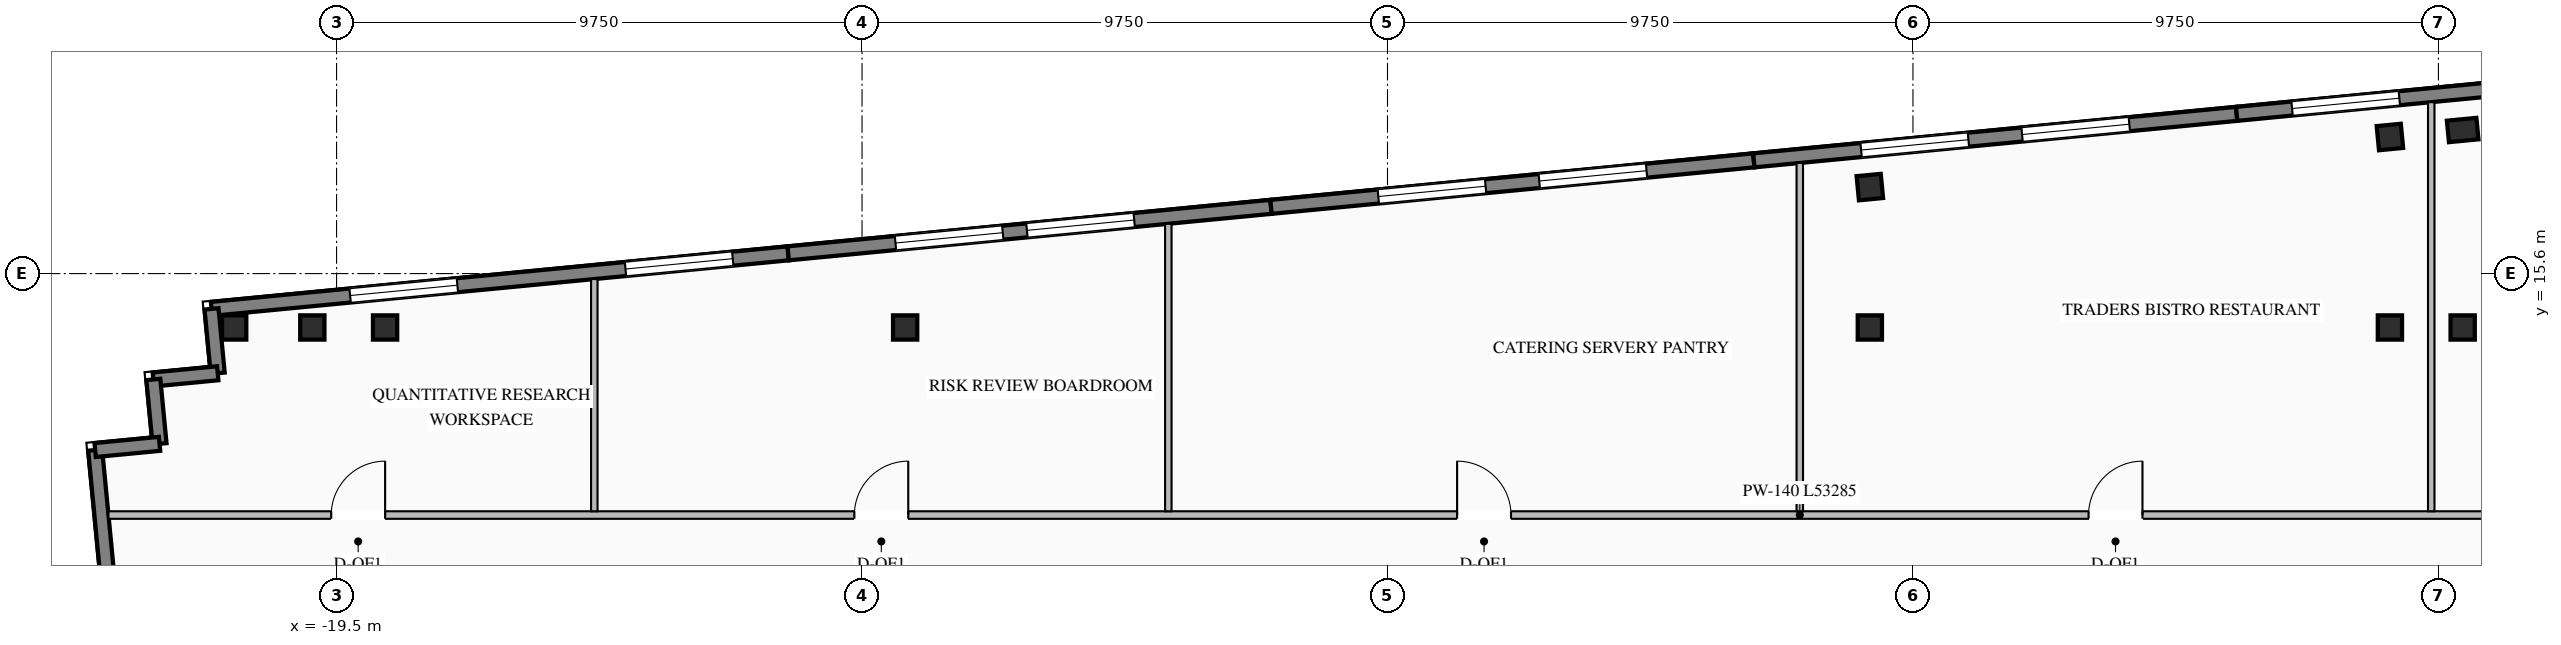
"""IFC4 building model, lengths in metres.
Left out: names, types, materials, properties, quantities, classifications, styles, units other than length and angle.
Written with IfcOpenShell. Run it as: python <this file> out.ifc"""

import sys

from ifc_helpers import new_model, si_unit, direction, frame, frame_2d, origin, origin_2d, place, context, subcontext, project, spatial, rectangle, i_section, extrude, element, fill, save


model = new_model("IFC4")
c1 = context("Model", 3, precision=1e-05, world=origin(), true_north=direction((0.0, 1.0)))
c2 = subcontext(c1, "Body", "Model", "MODEL_VIEW")
j1 = project(units=[si_unit("LENGTHUNIT", "METRE"), si_unit("PLANEANGLEUNIT", "RADIAN")], contexts=[c1])
p1 = place(None, origin())
s1 = spatial("IfcSite", under=j1, at=p1, CompositionType="ELEMENT")
p2 = place(p1, origin())
s2 = spatial("IfcBuilding", under=s1, at=p2, CompositionType="ELEMENT")
p3 = place(p2, frame((0.0, 0.0, 262.05)))
s3 = spatial("IfcBuildingStorey", under=s2, at=p3, CompositionType="ELEMENT", Elevation=262.05)
for number, where, z_axis, x_axis in (
    (1, (-21.4, 14.6, 0.0), (0.0, 0.0, 1.0), (1.0, 0.0, 0.0)),
    (2, (-19.95, 14.6, 0.0), (0.0, 0.0, 1.0), (1.0, 0.0, 0.0)),
    (3, (-18.6, 14.6, 0.0), (0.0, 0.0, 1.0), (1.0, 0.0, 0.0)),
    (4, (-8.95, 14.6, 0.0), (0.0, 0.0, 1.0), (1.0, 0.0, 0.0)),
    (5, (8.95, 14.6, 0.0), (0.0, 0.0, 1.0), (1.0, 0.0, 0.0)),
    (6, (18.6, 14.6, 0.0), (0.0, 0.0, 1.0), (1.0, 0.0, 0.0)),
    (7, (19.95, 14.6, 0.0), (0.0, 0.0, 1.0), (1.0, 0.0, 0.0)),
    (8, (8.95, 17.205, 0.0), (0.0, 0.0, 1.0), (0.995, 0.096, 0.0)),
    (9, (18.6, 18.134, 0.0), (0.0, 0.0, 1.0), (0.995, 0.096, 0.0)),
):
    element("IfcColumn", number, at=place(p3, frame(where, z_axis=z_axis, x_axis=x_axis)), inside=s3, PredefinedType="COLUMN", context=c2, shape_type="SweptSolid", body=[
        extrude(i_section(OverallWidth=0.45, OverallDepth=0.45, WebThickness=0.022, FlangeThickness=0.032, at=origin_2d()), origin(), (0.0, 0.0, 1.0), 3.45),
    ])
p4 = place(p3, frame((19.95, 18.264, 0.0), z_axis=(0.0, 0.0, 1.0), x_axis=(0.995396198367, 0.09584575252, 0.0)))
e10 = element("IfcColumn", 10, at=p4, inside=s3, PredefinedType="PILASTER", context=c2, shape_type="SweptSolid", body=[
    extrude(rectangle(XDim=0.55, YDim=0.4, at=origin_2d()), origin(), (0.0, 0.0, 1.0), 3.45),
])
p5 = place(p3, frame((-21.821, 14.945, 0.0), z_axis=(0.0, 0.0, 1.0), x_axis=(0.995394787719, 0.095860401528, 0.0)))
e11 = element("IfcWall", 11, at=p5, inside=s3, PredefinedType="STANDARD", context=c2, shape_type="SweptSolid", body=[
    extrude(rectangle(XDim=10.75, YDim=0.26, at=frame_2d((5.375, 0.0))), origin(), (0.0, 0.0, 1.0), 3.25),
])
p6 = place(p5, frame((2.583, 0.0, 0.76)))
e12 = element("IfcOpeningElement", 12, at=p6, cuts=e11, PredefinedType="OPENING", context=c2, shape_type="SweptSolid", body=[
    extrude(rectangle(XDim=2.0, YDim=2.05, at=frame_2d((1.0, 1.025))), frame((0.0, 0.14, 0.0), z_axis=(0.0, -1.0, 0.0), x_axis=(1.0, 0.0, 0.0)), (0.0, 0.0, 1.0), 0.28),
])
p7 = place(p5, frame((7.717, 0.0, 0.76)))
e13 = element("IfcOpeningElement", 13, at=p7, cuts=e11, PredefinedType="OPENING", context=c2, shape_type="SweptSolid", body=[
    extrude(rectangle(XDim=2.0, YDim=2.05, at=frame_2d((1.0, 1.025))), frame((0.0, 0.14, 0.0), z_axis=(0.0, -1.0, 0.0), x_axis=(1.0, 0.0, 0.0)), (0.0, 0.0, 1.0), 0.28),
])
p8 = place(p3, frame((-11.12, 15.975, 0.0), z_axis=(0.0, 0.0, 1.0), x_axis=(0.995396794462, 0.09583956164, 0.0)))
e14 = element("IfcWall", 14, at=p8, inside=s3, PredefinedType="STANDARD", context=c2, shape_type="SweptSolid", body=[
    extrude(rectangle(XDim=9.0, YDim=0.26, at=frame_2d((4.5, 0.0))), origin(), (0.0, 0.0, 1.0), 3.25),
])
p9 = place(p8, frame((2.0, 0.0, 0.76)))
e15 = element("IfcOpeningElement", 15, at=p9, cuts=e14, PredefinedType="OPENING", context=c2, shape_type="SweptSolid", body=[
    extrude(rectangle(XDim=2.0, YDim=2.05, at=frame_2d((1.0, 1.025))), frame((0.0, 0.14, 0.0), z_axis=(0.0, -1.0, 0.0), x_axis=(1.0, 0.0, 0.0)), (0.0, 0.0, 1.0), 0.28),
])
p10 = place(p8, frame((4.45, 0.0, 0.76)))
e16 = element("IfcOpeningElement", 16, at=p10, cuts=e14, PredefinedType="OPENING", context=c2, shape_type="SweptSolid", body=[
    extrude(rectangle(XDim=2.0, YDim=2.05, at=frame_2d((1.0, 1.025))), frame((0.0, 0.14, 0.0), z_axis=(0.0, -1.0, 0.0), x_axis=(1.0, 0.0, 0.0)), (0.0, 0.0, 1.0), 0.28),
])
p11 = place(p3, frame((-2.161, 16.838, 0.0), z_axis=(0.0, 0.0, 1.0), x_axis=(0.995396794462, 0.09583956164, 0.0)))
e17 = element("IfcWall", 17, at=p11, inside=s3, PredefinedType="STANDARD", context=c2, shape_type="SweptSolid", body=[
    extrude(rectangle(XDim=9.0, YDim=0.26, at=frame_2d((4.5, 0.0))), origin(), (0.0, 0.0, 1.0), 3.25),
])
p12 = place(p11, frame((2.0, 0.0, 0.76)))
e18 = element("IfcOpeningElement", 18, at=p12, cuts=e17, PredefinedType="OPENING", context=c2, shape_type="SweptSolid", body=[
    extrude(rectangle(XDim=2.0, YDim=2.05, at=frame_2d((1.0, 1.025))), frame((0.0, 0.14, 0.0), z_axis=(0.0, -1.0, 0.0), x_axis=(1.0, 0.0, 0.0)), (0.0, 0.0, 1.0), 0.28),
])
p13 = place(p11, frame((5.0, 0.0, 0.76)))
e19 = element("IfcOpeningElement", 19, at=p13, cuts=e17, PredefinedType="OPENING", context=c2, shape_type="SweptSolid", body=[
    extrude(rectangle(XDim=2.0, YDim=2.05, at=frame_2d((1.0, 1.025))), frame((0.0, 0.14, 0.0), z_axis=(0.0, -1.0, 0.0), x_axis=(1.0, 0.0, 0.0)), (0.0, 0.0, 1.0), 0.28),
])
p14 = place(p3, frame((6.797, 17.7, 0.0), z_axis=(0.0, 0.0, 1.0), x_axis=(0.995394455533, 0.09586385082, 0.0)))
e20 = element("IfcWall", 20, at=p14, inside=s3, PredefinedType="STANDARD", context=c2, shape_type="SweptSolid", body=[
    extrude(rectangle(XDim=9.0, YDim=0.26, at=frame_2d((4.5, 0.0))), origin(), (0.0, 0.0, 1.0), 3.25),
])
p15 = place(p14, frame((2.0, 0.0, 0.76)))
e21 = element("IfcOpeningElement", 21, at=p15, cuts=e20, PredefinedType="OPENING", context=c2, shape_type="SweptSolid", body=[
    extrude(rectangle(XDim=2.0, YDim=2.05, at=frame_2d((1.0, 1.025))), frame((0.0, 0.14, 0.0), z_axis=(0.0, -1.0, 0.0), x_axis=(1.0, 0.0, 0.0)), (0.0, 0.0, 1.0), 0.28),
])
p16 = place(p14, frame((5.0, 0.0, 0.76)))
e22 = element("IfcOpeningElement", 22, at=p16, cuts=e20, PredefinedType="OPENING", context=c2, shape_type="SweptSolid", body=[
    extrude(rectangle(XDim=2.0, YDim=2.05, at=frame_2d((1.0, 1.025))), frame((0.0, 0.14, 0.0), z_axis=(0.0, -1.0, 0.0), x_axis=(1.0, 0.0, 0.0)), (0.0, 0.0, 1.0), 0.28),
])
p17 = place(p3, frame((15.756, 18.563, 0.0), z_axis=(0.0, 0.0, 1.0), x_axis=(0.995396745868, 0.095840066339, 0.0)))
e23 = element("IfcWall", 23, at=p17, inside=s3, PredefinedType="STANDARD", context=c2, shape_type="SweptSolid", body=[
    extrude(rectangle(XDim=10.75, YDim=0.26, at=frame_2d((5.375, 0.0))), origin(), (0.0, 0.0, 1.0), 3.25),
])
p18 = place(p17, frame((1.033, 0.0, 0.76)))
e24 = element("IfcOpeningElement", 24, at=p18, cuts=e23, PredefinedType="OPENING", context=c2, shape_type="SweptSolid", body=[
    extrude(rectangle(XDim=2.0, YDim=2.05, at=frame_2d((1.0, 1.025))), frame((0.0, 0.14, 0.0), z_axis=(0.0, -1.0, 0.0), x_axis=(1.0, 0.0, 0.0)), (0.0, 0.0, 1.0), 0.28),
])
p19 = place(p17, frame((6.167, 0.0, 0.76)))
e25 = element("IfcOpeningElement", 25, at=p19, cuts=e23, PredefinedType="OPENING", context=c2, shape_type="SweptSolid", body=[
    extrude(rectangle(XDim=2.0, YDim=2.05, at=frame_2d((1.0, 1.025))), frame((0.0, 0.14, 0.0), z_axis=(0.0, -1.0, 0.0), x_axis=(1.0, 0.0, 0.0)), (0.0, 0.0, 1.0), 0.28),
])
p20 = place(p3, frame((-22.527, -2.754, 0.0), z_axis=(0.0, 0.0, 1.0), x_axis=(-0.095850890337, 0.995395703638, 0.0)))
e26 = element("IfcWall", 26, at=p20, inside=s3, PredefinedType="STANDARD", context=c2, shape_type="SweptSolid", body=[
    extrude(rectangle(XDim=15.15, YDim=0.26, at=frame_2d((7.575, 0.0))), origin(), (0.0, 0.0, 1.0), 3.25),
])
p21 = place(p20, frame((4.35, 0.0, 0.76)))
e27 = element("IfcOpeningElement", 27, at=p21, cuts=e26, PredefinedType="OPENING", context=c2, shape_type="SweptSolid", body=[
    extrude(rectangle(XDim=1.4, YDim=1.95, at=frame_2d((0.7, 0.975))), frame((0.0, 0.14, 0.0), z_axis=(0.0, -1.0, 0.0), x_axis=(1.0, 0.0, 0.0)), (0.0, 0.0, 1.0), 0.28),
])
p22 = place(p20, frame((9.4, 0.0, 0.76)))
e28 = element("IfcOpeningElement", 28, at=p22, cuts=e26, PredefinedType="OPENING", context=c2, shape_type="SweptSolid", body=[
    extrude(rectangle(XDim=1.4, YDim=1.95, at=frame_2d((0.7, 0.975))), frame((0.0, 0.14, 0.0), z_axis=(0.0, -1.0, 0.0), x_axis=(1.0, 0.0, 0.0)), (0.0, 0.0, 1.0), 0.28),
])
p23 = place(p3, frame((-21.821, 14.945, 0.0), z_axis=(0.0, 0.0, 1.0), x_axis=(0.096038073607, -0.995377661201, 0.0)))
e29 = element("IfcWall", 29, at=p23, inside=s3, PredefinedType="STANDARD", context=c2, shape_type="SweptSolid", body=[
    extrude(rectangle(XDim=1.2, YDim=0.26, at=frame_2d((0.6, 0.0))), origin(), (0.0, 0.0, 1.0), 2.565),
])
for number, where, z_axis, x_axis in (
    (30, (-21.705, 13.75, 0.0), (0.0, 0.0, 1.0), (-0.995, -0.096, 0.0)),
    (31, (-22.9, 13.635, 0.0), (0.0, 0.0, 1.0), (0.096, -0.995, 0.0)),
    (32, (-22.785, 12.441, 0.0), (0.0, 0.0, 1.0), (-0.995, -0.096, 0.0)),
):
    element("IfcWall", number, at=place(p3, frame(where, z_axis=z_axis, x_axis=x_axis)), inside=s3, PredefinedType="STANDARD", context=c2, shape_type="SweptSolid", body=[
        extrude(rectangle(XDim=1.2, YDim=0.26, at=frame_2d((0.6, 0.0))), origin(), (0.0, 0.0, 1.0), 2.565),
    ])
p24 = place(p3, frame((-23.733, 11.12, 0.0), z_axis=(0.0, 0.0, 1.0), x_axis=(1.0, 0.0, 0.0)))
e33 = element("IfcWall", 33, at=p24, inside=s3, PredefinedType="STANDARD", context=c2, shape_type="SweptSolid", body=[
    extrude(rectangle(XDim=53.285, YDim=0.14, at=frame_2d((26.643, 0.0))), origin(), (0.0, 0.0, 1.0), 3.25),
])
p25 = place(p24, frame((4.133, 0.0, 0.0)))
e34 = element("IfcOpeningElement", 34, at=p25, cuts=e33, PredefinedType="OPENING", context=c2, shape_type="SweptSolid", body=[
    extrude(rectangle(XDim=1.0, YDim=2.08, at=frame_2d((0.5, 1.04))), frame((0.0, 0.08, 0.0), z_axis=(0.0, -1.0, 0.0), x_axis=(1.0, 0.0, 0.0)), (0.0, 0.0, 1.0), 0.16),
])
p26 = place(p24, frame((13.84, 0.0, 0.0)))
e35 = element("IfcOpeningElement", 35, at=p26, cuts=e33, PredefinedType="OPENING", context=c2, shape_type="SweptSolid", body=[
    extrude(rectangle(XDim=1.0, YDim=2.08, at=frame_2d((0.5, 1.04))), frame((0.0, 0.08, 0.0), z_axis=(0.0, -1.0, 0.0), x_axis=(1.0, 0.0, 0.0)), (0.0, 0.0, 1.0), 0.16),
])
p27 = place(p24, frame((25.024, 0.0, 0.0)))
e36 = element("IfcOpeningElement", 36, at=p27, cuts=e33, PredefinedType="OPENING", context=c2, shape_type="SweptSolid", body=[
    extrude(rectangle(XDim=1.0, YDim=2.08, at=frame_2d((0.5, 1.04))), frame((0.0, 0.08, 0.0), z_axis=(0.0, -1.0, 0.0), x_axis=(1.0, 0.0, 0.0)), (0.0, 0.0, 1.0), 0.16),
])
p28 = place(p24, frame((36.741, 0.0, 0.0)))
e37 = element("IfcOpeningElement", 37, at=p28, cuts=e33, PredefinedType="OPENING", context=c2, shape_type="SweptSolid", body=[
    extrude(rectangle(XDim=1.0, YDim=2.08, at=frame_2d((0.5, 1.04))), frame((0.0, 0.08, 0.0), z_axis=(0.0, -1.0, 0.0), x_axis=(1.0, 0.0, 0.0)), (0.0, 0.0, 1.0), 0.16),
])
p29 = place(p24, frame((47.566, 0.0, 0.0)))
e38 = element("IfcOpeningElement", 38, at=p29, cuts=e33, PredefinedType="OPENING", context=c2, shape_type="SweptSolid", body=[
    extrude(rectangle(XDim=1.0, YDim=2.08, at=frame_2d((0.5, 1.04))), frame((0.0, 0.08, 0.0), z_axis=(0.0, -1.0, 0.0), x_axis=(1.0, 0.0, 0.0)), (0.0, 0.0, 1.0), 0.16),
])
p30 = place(p3, frame((-14.718, 11.19, 0.0), z_axis=(0.0, 0.0, 1.0), x_axis=(0.0, 1.0, 0.0)))
e39 = element("IfcWall", 39, at=p30, inside=s3, PredefinedType="STANDARD", context=c2, shape_type="SweptSolid", body=[
    extrude(rectangle(XDim=4.308, YDim=0.12, at=frame_2d((2.154, 0.0))), origin(), (0.0, 0.0, 1.0), 3.25),
])
p31 = place(p3, frame((-4.067, 11.19, 0.0), z_axis=(0.0, 0.0, 1.0), x_axis=(0.0, 1.0, 0.0)))
e40 = element("IfcWall", 40, at=p31, inside=s3, PredefinedType="STANDARD", context=c2, shape_type="SweptSolid", body=[
    extrude(rectangle(XDim=5.334, YDim=0.12, at=frame_2d((2.667, 0.0))), origin(), (0.0, 0.0, 1.0), 3.25),
])
p32 = place(p3, frame((7.65, 11.19, 0.0), z_axis=(0.0, 0.0, 1.0), x_axis=(0.0, 1.0, 0.0)))
e41 = element("IfcWall", 41, at=p32, inside=s3, PredefinedType="STANDARD", context=c2, shape_type="SweptSolid", body=[
    extrude(rectangle(XDim=6.462, YDim=0.12, at=frame_2d((3.231, 0.0))), origin(), (0.0, 0.0, 1.0), 3.25),
])
p33 = place(p3, frame((19.367, 11.19, 0.0), z_axis=(0.0, 0.0, 1.0), x_axis=(0.0, 1.0, 0.0)))
e42 = element("IfcWall", 42, at=p33, inside=s3, PredefinedType="STANDARD", context=c2, shape_type="SweptSolid", body=[
    extrude(rectangle(XDim=7.59, YDim=0.12, at=frame_2d((3.795, 0.0))), origin(), (0.0, 0.0, 1.0), 3.25),
])
p34 = place(p6, origin())
e43 = element("IfcWindow", 43, at=p34, inside=s3, PartitioningType="DOUBLE_PANEL_VERTICAL", PredefinedType="WINDOW", context=c2, shape_type="SweptSolid", body=[
    extrude(rectangle(XDim=2.0, YDim=2.05, at=frame_2d((1.0, 1.025))), frame((0.0, 0.03, 0.0), z_axis=(0.0, -1.0, 0.0), x_axis=(1.0, 0.0, 0.0)), (0.0, 0.0, 1.0), 0.06),
])
fill(e12, e43)
p35 = place(p7, origin())
e44 = element("IfcWindow", 44, at=p35, inside=s3, PartitioningType="DOUBLE_PANEL_VERTICAL", PredefinedType="WINDOW", context=c2, shape_type="SweptSolid", body=[
    extrude(rectangle(XDim=2.0, YDim=2.05, at=frame_2d((1.0, 1.025))), frame((0.0, 0.03, 0.0), z_axis=(0.0, -1.0, 0.0), x_axis=(1.0, 0.0, 0.0)), (0.0, 0.0, 1.0), 0.06),
])
fill(e13, e44)
p36 = place(p9, origin())
e45 = element("IfcWindow", 45, at=p36, inside=s3, PartitioningType="DOUBLE_PANEL_VERTICAL", PredefinedType="WINDOW", context=c2, shape_type="SweptSolid", body=[
    extrude(rectangle(XDim=2.0, YDim=2.05, at=frame_2d((1.0, 1.025))), frame((0.0, 0.03, 0.0), z_axis=(0.0, -1.0, 0.0), x_axis=(1.0, 0.0, 0.0)), (0.0, 0.0, 1.0), 0.06),
])
fill(e15, e45)
p37 = place(p10, origin())
e46 = element("IfcWindow", 46, at=p37, inside=s3, PartitioningType="DOUBLE_PANEL_VERTICAL", PredefinedType="WINDOW", context=c2, shape_type="SweptSolid", body=[
    extrude(rectangle(XDim=2.0, YDim=2.05, at=frame_2d((1.0, 1.025))), frame((0.0, 0.03, 0.0), z_axis=(0.0, -1.0, 0.0), x_axis=(1.0, 0.0, 0.0)), (0.0, 0.0, 1.0), 0.06),
])
fill(e16, e46)
p38 = place(p12, origin())
e47 = element("IfcWindow", 47, at=p38, inside=s3, PartitioningType="DOUBLE_PANEL_VERTICAL", PredefinedType="WINDOW", context=c2, shape_type="SweptSolid", body=[
    extrude(rectangle(XDim=2.0, YDim=2.05, at=frame_2d((1.0, 1.025))), frame((0.0, 0.03, 0.0), z_axis=(0.0, -1.0, 0.0), x_axis=(1.0, 0.0, 0.0)), (0.0, 0.0, 1.0), 0.06),
])
fill(e18, e47)
p39 = place(p13, origin())
e48 = element("IfcWindow", 48, at=p39, inside=s3, PartitioningType="DOUBLE_PANEL_VERTICAL", PredefinedType="WINDOW", context=c2, shape_type="SweptSolid", body=[
    extrude(rectangle(XDim=2.0, YDim=2.05, at=frame_2d((1.0, 1.025))), frame((0.0, 0.03, 0.0), z_axis=(0.0, -1.0, 0.0), x_axis=(1.0, 0.0, 0.0)), (0.0, 0.0, 1.0), 0.06),
])
fill(e19, e48)
p40 = place(p15, origin())
e49 = element("IfcWindow", 49, at=p40, inside=s3, PartitioningType="DOUBLE_PANEL_VERTICAL", PredefinedType="WINDOW", context=c2, shape_type="SweptSolid", body=[
    extrude(rectangle(XDim=2.0, YDim=2.05, at=frame_2d((1.0, 1.025))), frame((0.0, 0.03, 0.0), z_axis=(0.0, -1.0, 0.0), x_axis=(1.0, 0.0, 0.0)), (0.0, 0.0, 1.0), 0.06),
])
fill(e21, e49)
p41 = place(p16, origin())
e50 = element("IfcWindow", 50, at=p41, inside=s3, PartitioningType="DOUBLE_PANEL_VERTICAL", PredefinedType="WINDOW", context=c2, shape_type="SweptSolid", body=[
    extrude(rectangle(XDim=2.0, YDim=2.05, at=frame_2d((1.0, 1.025))), frame((0.0, 0.03, 0.0), z_axis=(0.0, -1.0, 0.0), x_axis=(1.0, 0.0, 0.0)), (0.0, 0.0, 1.0), 0.06),
])
fill(e22, e50)
p42 = place(p18, origin())
e51 = element("IfcWindow", 51, at=p42, inside=s3, PartitioningType="DOUBLE_PANEL_VERTICAL", PredefinedType="WINDOW", context=c2, shape_type="SweptSolid", body=[
    extrude(rectangle(XDim=2.0, YDim=2.05, at=frame_2d((1.0, 1.025))), frame((0.0, 0.03, 0.0), z_axis=(0.0, -1.0, 0.0), x_axis=(1.0, 0.0, 0.0)), (0.0, 0.0, 1.0), 0.06),
])
fill(e24, e51)
p43 = place(p25, origin())
e52 = element("IfcDoor", 52, at=p43, inside=s3, OperationType="SINGLE_SWING_RIGHT", PredefinedType="DOOR", context=c2, shape_type="SweptSolid", body=[
    extrude(rectangle(XDim=1.0, YDim=2.08, at=frame_2d((0.5, 1.04))), frame((0.0, 0.025, 0.0), z_axis=(0.0, -1.0, 0.0), x_axis=(1.0, 0.0, 0.0)), (0.0, 0.0, 1.0), 0.05),
])
fill(e34, e52)
p44 = place(p26, origin())
e53 = element("IfcDoor", 53, at=p44, inside=s3, OperationType="SINGLE_SWING_RIGHT", PredefinedType="DOOR", context=c2, shape_type="SweptSolid", body=[
    extrude(rectangle(XDim=1.0, YDim=2.08, at=frame_2d((0.5, 1.04))), frame((0.0, 0.025, 0.0), z_axis=(0.0, -1.0, 0.0), x_axis=(1.0, 0.0, 0.0)), (0.0, 0.0, 1.0), 0.05),
])
fill(e35, e53)
p45 = place(p27, origin())
e54 = element("IfcDoor", 54, at=p45, inside=s3, OperationType="SINGLE_SWING_LEFT", PredefinedType="DOOR", context=c2, shape_type="SweptSolid", body=[
    extrude(rectangle(XDim=1.0, YDim=2.08, at=frame_2d((0.5, 1.04))), frame((0.0, 0.025, 0.0), z_axis=(0.0, -1.0, 0.0), x_axis=(1.0, 0.0, 0.0)), (0.0, 0.0, 1.0), 0.05),
])
fill(e36, e54)
p46 = place(p28, origin())
e55 = element("IfcDoor", 55, at=p46, inside=s3, OperationType="SINGLE_SWING_RIGHT", PredefinedType="DOOR", context=c2, shape_type="SweptSolid", body=[
    extrude(rectangle(XDim=1.0, YDim=2.08, at=frame_2d((0.5, 1.04))), frame((0.0, 0.025, 0.0), z_axis=(0.0, -1.0, 0.0), x_axis=(1.0, 0.0, 0.0)), (0.0, 0.0, 1.0), 0.05),
])
fill(e37, e55)
save(model, sys.argv[1])
